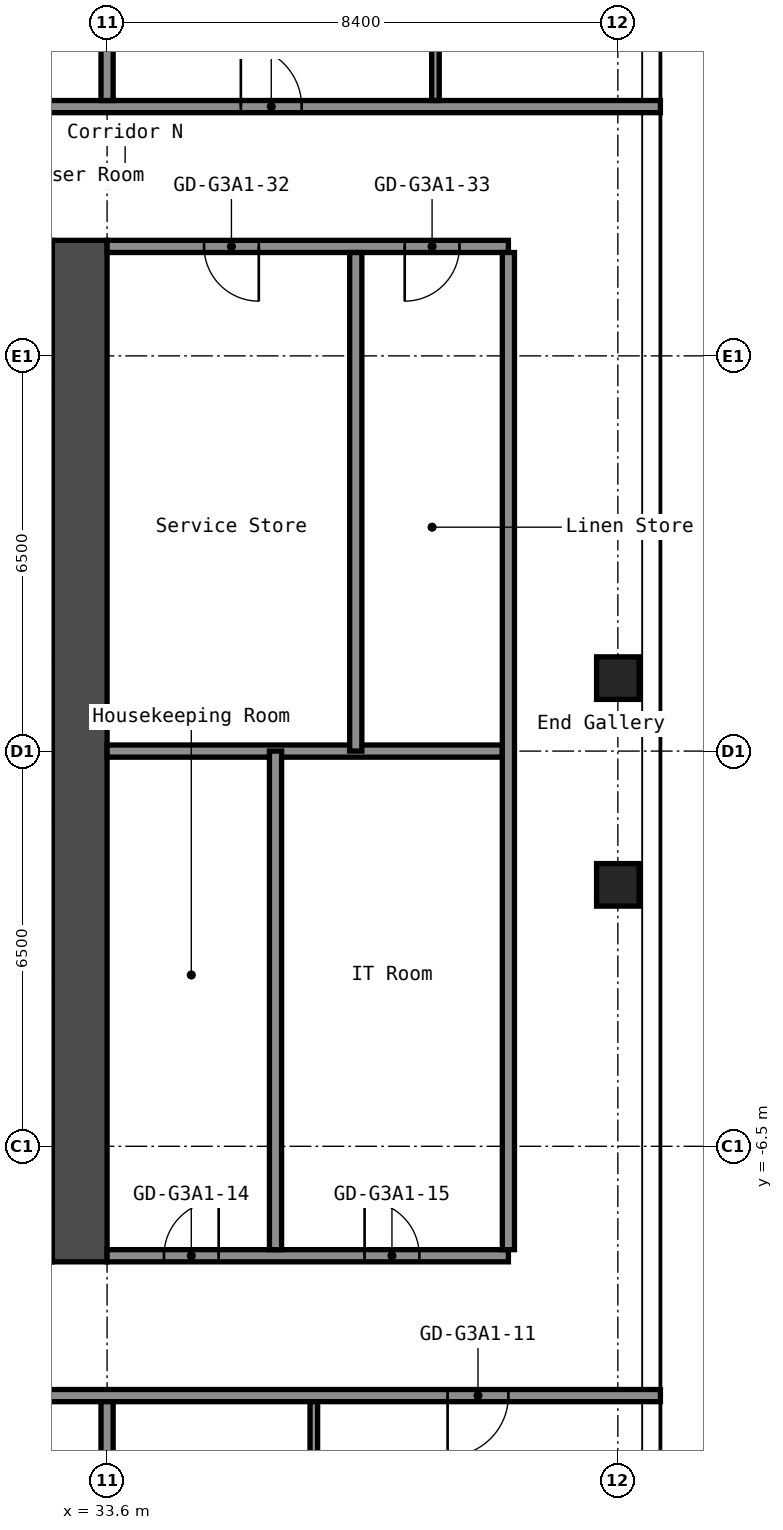
"""IFC4 building model, lengths in metres.
Left out: names, types, materials, properties, quantities, classifications, styles, units other than length and angle.
Written with IfcOpenShell. Run it as: python <this file> out.ifc"""

import sys

from ifc_helpers import new_model, si_unit, direction, frame, frame_2d, origin, origin_2d, place, context, subcontext, project, spatial, rectangle, hollow_rectangle, extrude, element, fill, save


model = new_model("IFC4")
c1 = context("Model", 3, precision=1e-05, world=origin(), true_north=direction((0.0, 1.0)))
c2 = subcontext(c1, "Body", "Model", "MODEL_VIEW")
j1 = project(units=[si_unit("LENGTHUNIT", "METRE"), si_unit("PLANEANGLEUNIT", "RADIAN")], contexts=[c1])
p1 = place(None, origin())
s1 = spatial("IfcSite", under=j1, at=p1, CompositionType="ELEMENT")
p2 = place(p1, origin())
s2 = spatial("IfcBuilding", under=s1, at=p2, CompositionType="ELEMENT")
p3 = place(p2, frame((0.0, 0.0, 147.0)))
s3 = spatial("IfcBuildingStorey", under=s2, at=p3, CompositionType="ELEMENT", Elevation=147.0)
for number, where, z_axis, x_axis in (
    (1, (42.0, -2.2, 0.0), (0.0, 0.0, 1.0), (1.0, 0.0, 0.0)),
    (2, (42.0, 1.2, 0.0), (0.0, 0.0, 1.0), (1.0, 0.0, 0.0)),
):
    element("IfcColumn", number, at=place(p3, frame(where, z_axis=z_axis, x_axis=x_axis)), inside=s3, PredefinedType="COLUMN", context=c2, shape_type="SweptSolid", body=[
        extrude(hollow_rectangle(XDim=0.7, YDim=0.7, WallThickness=0.028, at=origin_2d()), origin(), (0.0, 0.0, 1.0), 2.75),
    ])
p4 = place(p3, frame((33.15, -8.4, 0.0), z_axis=(0.0, 0.0, 1.0), x_axis=(0.0, 1.0, 0.0)))
e3 = element("IfcWall", 3, at=p4, inside=s3, PredefinedType="SHEAR", context=c2, shape_type="SweptSolid", body=[
    extrude(rectangle(XDim=16.8, YDim=0.9, at=frame_2d((8.4, 0.0))), origin(), (0.0, 0.0, 1.0), 2.75),
])
p5 = place(p3, frame((16.8, -10.6, 0.0), z_axis=(0.0, 0.0, 1.0), x_axis=(1.0, 0.0, 0.0)))
e4 = element("IfcWall", 4, at=p5, inside=s3, PredefinedType="PARTITIONING", context=c2, shape_type="SweptSolid", body=[
    extrude(rectangle(XDim=25.9, YDim=0.2, at=frame_2d((12.95, 0.0))), origin(), (0.0, 0.0, 1.0), 2.75),
])
p6 = place(p5, frame((2.0, 0.0, 0.0)))
e5 = element("IfcOpeningElement", 5, at=p6, cuts=e4, PredefinedType="OPENING", context=c2, shape_type="SweptSolid", body=[
    extrude(rectangle(XDim=1.0, YDim=2.1, at=frame_2d((0.5, 1.05))), frame((0.0, 0.11, 0.0), z_axis=(0.0, -1.0, 0.0), x_axis=(1.0, 0.0, 0.0)), (0.0, 0.0, 1.0), 0.22),
])
p7 = place(p5, frame((10.4, 0.0, 0.0)))
e6 = element("IfcOpeningElement", 6, at=p7, cuts=e4, PredefinedType="OPENING", context=c2, shape_type="SweptSolid", body=[
    extrude(rectangle(XDim=1.0, YDim=2.1, at=frame_2d((0.5, 1.05))), frame((0.0, 0.11, 0.0), z_axis=(0.0, -1.0, 0.0), x_axis=(1.0, 0.0, 0.0)), (0.0, 0.0, 1.0), 0.22),
])
p8 = place(p5, frame((22.4, 0.0, 0.0)))
e7 = element("IfcOpeningElement", 7, at=p8, cuts=e4, PredefinedType="OPENING", context=c2, shape_type="SweptSolid", body=[
    extrude(rectangle(XDim=1.0, YDim=2.1, at=frame_2d((0.5, 1.05))), frame((0.0, 0.11, 0.0), z_axis=(0.0, -1.0, 0.0), x_axis=(1.0, 0.0, 0.0)), (0.0, 0.0, 1.0), 0.22),
])
p9 = place(p3, frame((33.6, -8.3, 0.0), z_axis=(0.0, 0.0, 1.0), x_axis=(1.0, 0.0, 0.0)))
e8 = element("IfcWall", 8, at=p9, inside=s3, PredefinedType="PARTITIONING", context=c2, shape_type="SweptSolid", body=[
    extrude(rectangle(XDim=6.6, YDim=0.2, at=frame_2d((3.3, 0.0))), origin(), (0.0, 0.0, 1.0), 2.75),
])
p10 = place(p9, frame((0.935, 0.0, 0.0)))
e9 = element("IfcOpeningElement", 9, at=p10, cuts=e8, PredefinedType="OPENING", context=c2, shape_type="SweptSolid", body=[
    extrude(rectangle(XDim=0.9, YDim=2.1, at=frame_2d((0.45, 1.05))), frame((0.0, 0.11, 0.0), z_axis=(0.0, -1.0, 0.0), x_axis=(1.0, 0.0, 0.0)), (0.0, 0.0, 1.0), 0.22),
])
p11 = place(p9, frame((4.235, 0.0, 0.0)))
e10 = element("IfcOpeningElement", 10, at=p11, cuts=e8, PredefinedType="OPENING", context=c2, shape_type="SweptSolid", body=[
    extrude(rectangle(XDim=0.9, YDim=2.1, at=frame_2d((0.45, 1.05))), frame((0.0, 0.11, 0.0), z_axis=(0.0, -1.0, 0.0), x_axis=(1.0, 0.0, 0.0)), (0.0, 0.0, 1.0), 0.22),
])
p12 = place(p3, frame((33.6, 0.0, 0.0), z_axis=(0.0, 0.0, 1.0), x_axis=(1.0, 0.0, 0.0)))
e11 = element("IfcWall", 11, at=p12, inside=s3, PredefinedType="PARTITIONING", context=c2, shape_type="SweptSolid", body=[
    extrude(rectangle(XDim=6.5, YDim=0.2, at=frame_2d((3.25, 0.0))), origin(), (0.0, 0.0, 1.0), 2.75),
])
p13 = place(p3, frame((33.6, 8.3, 0.0), z_axis=(0.0, 0.0, 1.0), x_axis=(1.0, 0.0, 0.0)))
e12 = element("IfcWall", 12, at=p13, inside=s3, PredefinedType="PARTITIONING", context=c2, shape_type="SweptSolid", body=[
    extrude(rectangle(XDim=6.6, YDim=0.2, at=frame_2d((3.3, 0.0))), origin(), (0.0, 0.0, 1.0), 2.75),
])
p14 = place(p13, frame((1.595, 0.0, 0.0)))
e13 = element("IfcOpeningElement", 13, at=p14, cuts=e12, PredefinedType="OPENING", context=c2, shape_type="SweptSolid", body=[
    extrude(rectangle(XDim=0.9, YDim=2.1, at=frame_2d((0.45, 1.05))), frame((0.0, 0.11, 0.0), z_axis=(0.0, -1.0, 0.0), x_axis=(1.0, 0.0, 0.0)), (0.0, 0.0, 1.0), 0.22),
])
p15 = place(p13, frame((4.895, 0.0, 0.0)))
e14 = element("IfcOpeningElement", 14, at=p15, cuts=e12, PredefinedType="OPENING", context=c2, shape_type="SweptSolid", body=[
    extrude(rectangle(XDim=0.9, YDim=2.1, at=frame_2d((0.45, 1.05))), frame((0.0, 0.11, 0.0), z_axis=(0.0, -1.0, 0.0), x_axis=(1.0, 0.0, 0.0)), (0.0, 0.0, 1.0), 0.22),
])
p16 = place(p3, frame((16.8, 10.6, 0.0), z_axis=(0.0, 0.0, 1.0), x_axis=(1.0, 0.0, 0.0)))
e15 = element("IfcWall", 15, at=p16, inside=s3, PredefinedType="PARTITIONING", context=c2, shape_type="SweptSolid", body=[
    extrude(rectangle(XDim=25.9, YDim=0.2, at=frame_2d((12.95, 0.0))), origin(), (0.0, 0.0, 1.0), 2.75),
])
p17 = place(p16, frame((5.4, 0.0, 0.0)))
e16 = element("IfcOpeningElement", 16, at=p17, cuts=e15, PredefinedType="OPENING", context=c2, shape_type="SweptSolid", body=[
    extrude(rectangle(XDim=1.0, YDim=2.1, at=frame_2d((0.5, 1.05))), frame((0.0, 0.11, 0.0), z_axis=(0.0, -1.0, 0.0), x_axis=(1.0, 0.0, 0.0)), (0.0, 0.0, 1.0), 0.22),
])
p18 = place(p16, frame((13.8, 0.0, 0.0)))
e17 = element("IfcOpeningElement", 17, at=p18, cuts=e15, PredefinedType="OPENING", context=c2, shape_type="SweptSolid", body=[
    extrude(rectangle(XDim=1.0, YDim=2.1, at=frame_2d((0.5, 1.05))), frame((0.0, 0.11, 0.0), z_axis=(0.0, -1.0, 0.0), x_axis=(1.0, 0.0, 0.0)), (0.0, 0.0, 1.0), 0.22),
])
p19 = place(p16, frame((19.0, 0.0, 0.0)))
e18 = element("IfcOpeningElement", 18, at=p19, cuts=e15, PredefinedType="OPENING", context=c2, shape_type="SweptSolid", body=[
    extrude(rectangle(XDim=1.0, YDim=2.1, at=frame_2d((0.5, 1.05))), frame((0.0, 0.11, 0.0), z_axis=(0.0, -1.0, 0.0), x_axis=(1.0, 0.0, 0.0)), (0.0, 0.0, 1.0), 0.22),
])
p20 = place(p3, frame((33.6, -19.3, 0.0), z_axis=(0.0, 0.0, 1.0), x_axis=(0.0, 1.0, 0.0)))
e19 = element("IfcWall", 19, at=p20, inside=s3, PredefinedType="PARTITIONING", context=c2, shape_type="SweptSolid", body=[
    extrude(rectangle(XDim=8.6, YDim=0.2, at=frame_2d((4.3, 0.0))), origin(), (0.0, 0.0, 1.0), 2.75),
])
p21 = place(p3, frame((33.6, 10.7, 0.0), z_axis=(0.0, 0.0, 1.0), x_axis=(0.0, 1.0, 0.0)))
e20 = element("IfcWall", 20, at=p21, inside=s3, PredefinedType="PARTITIONING", context=c2, shape_type="SweptSolid", body=[
    extrude(rectangle(XDim=7.6, YDim=0.2, at=frame_2d((3.8, 0.0))), origin(), (0.0, 0.0, 1.0), 2.75),
])
p22 = place(p3, frame((36.37, -8.2, 0.0), z_axis=(0.0, 0.0, 1.0), x_axis=(0.0, 1.0, 0.0)))
e21 = element("IfcWall", 21, at=p22, inside=s3, PredefinedType="PARTITIONING", context=c2, shape_type="SweptSolid", body=[
    extrude(rectangle(XDim=8.2, YDim=0.2, at=frame_2d((4.1, 0.0))), origin(), (0.0, 0.0, 1.0), 2.75),
])
p23 = place(p3, frame((37.0, -14.0, 0.0), z_axis=(0.0, 0.0, 1.0), x_axis=(0.0, 1.0, 0.0)))
e22 = element("IfcWall", 22, at=p23, inside=s3, PredefinedType="PARTITIONING", context=c2, shape_type="SweptSolid", body=[
    extrude(rectangle(XDim=3.3, YDim=0.125, at=frame_2d((1.65, 0.0))), origin(), (0.0, 0.0, 1.0), 2.75),
])
p24 = place(p3, frame((37.69, 0.0, 0.0), z_axis=(0.0, 0.0, 1.0), x_axis=(0.0, 1.0, 0.0)))
e23 = element("IfcWall", 23, at=p24, inside=s3, PredefinedType="PARTITIONING", context=c2, shape_type="SweptSolid", body=[
    extrude(rectangle(XDim=8.2, YDim=0.2, at=frame_2d((4.1, 0.0))), origin(), (0.0, 0.0, 1.0), 2.75),
])
p25 = place(p3, frame((39.0, 10.7, 0.0), z_axis=(0.0, 0.0, 1.0), x_axis=(0.0, 1.0, 0.0)))
e24 = element("IfcWall", 24, at=p25, inside=s3, PredefinedType="PARTITIONING", context=c2, shape_type="SweptSolid", body=[
    extrude(rectangle(XDim=3.3, YDim=0.125, at=frame_2d((1.65, 0.0))), origin(), (0.0, 0.0, 1.0), 2.75),
])
p26 = place(p3, frame((40.2, -8.2, 0.0), z_axis=(0.0, 0.0, 1.0), x_axis=(0.0, 1.0, 0.0)))
e25 = element("IfcWall", 25, at=p26, inside=s3, PredefinedType="PARTITIONING", context=c2, shape_type="SweptSolid", body=[
    extrude(rectangle(XDim=16.4, YDim=0.2, at=frame_2d((8.2, 0.0))), origin(), (0.0, 0.0, 1.0), 2.75),
])
p27 = place(p8, origin())
e26 = element("IfcDoor", 26, at=p27, inside=s3, OperationType="SINGLE_SWING_LEFT", PredefinedType="DOOR", context=c2, shape_type="SweptSolid", body=[
    extrude(rectangle(XDim=1.0, YDim=2.1, at=frame_2d((0.5, 1.05))), frame((0.0, 0.025, 0.0), z_axis=(0.0, -1.0, 0.0), x_axis=(1.0, 0.0, 0.0)), (0.0, 0.0, 1.0), 0.05),
])
fill(e7, e26)
p28 = place(p10, origin())
e27 = element("IfcDoor", 27, at=p28, inside=s3, OperationType="SINGLE_SWING_LEFT", PredefinedType="DOOR", context=c2, shape_type="SweptSolid", body=[
    extrude(rectangle(XDim=0.9, YDim=2.1, at=frame_2d((0.45, 1.05))), frame((0.0, 0.025, 0.0), z_axis=(0.0, -1.0, 0.0), x_axis=(1.0, 0.0, 0.0)), (0.0, 0.0, 1.0), 0.05),
])
fill(e9, e27)
p29 = place(p11, origin())
e28 = element("IfcDoor", 28, at=p29, inside=s3, OperationType="SINGLE_SWING_RIGHT", PredefinedType="DOOR", context=c2, shape_type="SweptSolid", body=[
    extrude(rectangle(XDim=0.9, YDim=2.1, at=frame_2d((0.45, 1.05))), frame((0.0, 0.025, 0.0), z_axis=(0.0, -1.0, 0.0), x_axis=(1.0, 0.0, 0.0)), (0.0, 0.0, 1.0), 0.05),
])
fill(e10, e28)
p30 = place(p14, origin())
e29 = element("IfcDoor", 29, at=p30, inside=s3, OperationType="SINGLE_SWING_RIGHT", PredefinedType="DOOR", context=c2, shape_type="SweptSolid", body=[
    extrude(rectangle(XDim=0.9, YDim=2.1, at=frame_2d((0.45, 1.05))), frame((0.0, 0.025, 0.0), z_axis=(0.0, -1.0, 0.0), x_axis=(1.0, 0.0, 0.0)), (0.0, 0.0, 1.0), 0.05),
])
fill(e13, e29)
p31 = place(p15, origin())
e30 = element("IfcDoor", 30, at=p31, inside=s3, OperationType="SINGLE_SWING_LEFT", PredefinedType="DOOR", context=c2, shape_type="SweptSolid", body=[
    extrude(rectangle(XDim=0.9, YDim=2.1, at=frame_2d((0.45, 1.05))), frame((0.0, 0.025, 0.0), z_axis=(0.0, -1.0, 0.0), x_axis=(1.0, 0.0, 0.0)), (0.0, 0.0, 1.0), 0.05),
])
fill(e14, e30)
p32 = place(p19, origin())
e31 = element("IfcDoor", 31, at=p32, inside=s3, OperationType="SINGLE_SWING_RIGHT", PredefinedType="DOOR", context=c2, shape_type="SweptSolid", body=[
    extrude(rectangle(XDim=1.0, YDim=2.1, at=frame_2d((0.5, 1.05))), frame((0.0, 0.025, 0.0), z_axis=(0.0, -1.0, 0.0), x_axis=(1.0, 0.0, 0.0)), (0.0, 0.0, 1.0), 0.05),
])
fill(e18, e31)
save(model, sys.argv[1])
